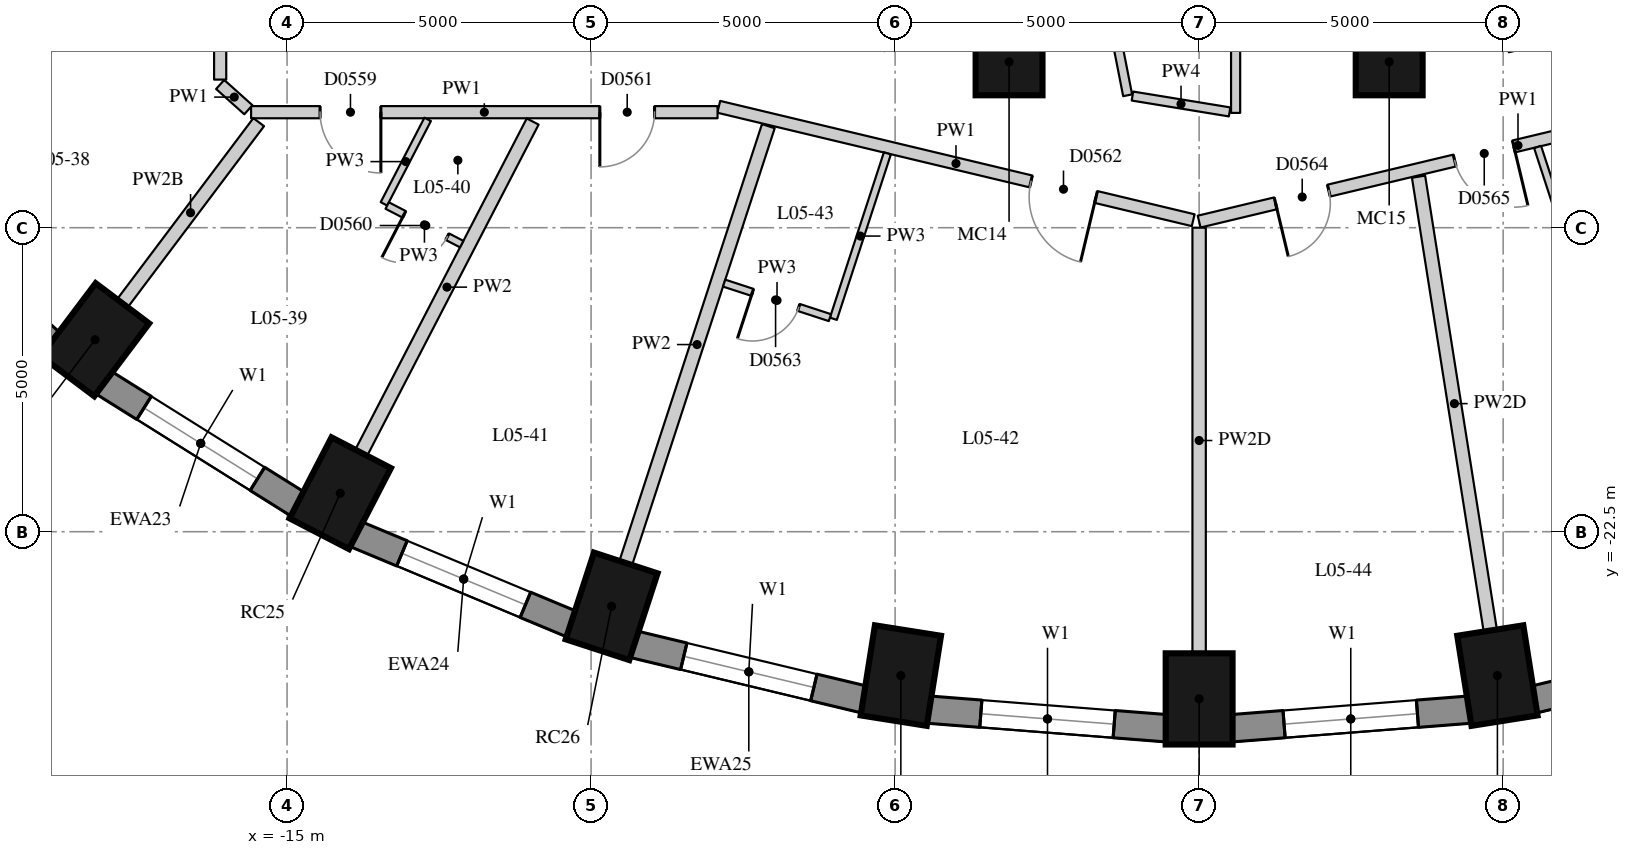
"""IFC4 building model, lengths in metres.
Left out: names, types, materials, properties, quantities, classifications, styles, units other than length and angle.
Written with IfcOpenShell. Run it as: python <this file> out.ifc"""

import sys

from ifc_helpers import new_model, si_unit, direction, frame, frame_2d, origin, origin_2d, place, context, subcontext, project, spatial, rectangle, extrude, element, fill, save


model = new_model("IFC4")
c1 = context("Model", 3, precision=1e-05, world=origin(), true_north=direction((0.0, 1.0)))
c2 = subcontext(c1, "Body", "Model", "MODEL_VIEW")
j1 = project(units=[si_unit("LENGTHUNIT", "METRE"), si_unit("PLANEANGLEUNIT", "RADIAN")], contexts=[c1])
p1 = place(None, origin())
s1 = spatial("IfcSite", under=j1, at=p1, CompositionType="ELEMENT")
p2 = place(p1, origin())
s2 = spatial("IfcBuilding", under=s1, at=p2, CompositionType="ELEMENT")
p3 = place(p2, frame((0.0, 0.0, 25.0)))
s3 = spatial("IfcBuildingStorey", under=s2, at=p3, CompositionType="ELEMENT", Elevation=25.0)
for number, where, z_axis, x_axis in (
    (1, (-18.159, -19.343, 0.0), (0.0, 0.0, 1.0), (-0.601, -0.799, 0.0)),
    (2, (-14.125, -21.867, 0.0), (0.0, 0.0, 1.0), (-0.46, -0.888, 0.0)),
    (3, (-9.662, -23.727, 0.0), (0.0, 0.0, 1.0), (-0.31, -0.951, 0.0)),
    (4, (-4.906, -24.866, 0.0), (0.0, 0.0, 1.0), (-0.156, -0.988, 0.0)),
    (5, (0.0, -25.25, 0.0), (0.0, 0.0, 1.0), (0.0, -1.0, 0.0)),
    (6, (4.906, -24.866, 0.0), (0.0, 0.0, 1.0), (0.156, -0.988, 0.0)),
):
    element("IfcColumn", number, at=place(p3, frame(where, z_axis=z_axis, x_axis=x_axis)), inside=s3, PredefinedType="COLUMN", context=c2, shape_type="SweptSolid", body=[
        extrude(rectangle(XDim=1.5, YDim=1.1, at=origin_2d()), origin(), (0.0, 0.0, 1.0), 3.3),
    ])
for number, where, z_axis, x_axis in (
    (7, (-3.126, -14.772, 0.0), (0.0, 0.0, 1.0), (1.0, 0.0, 0.0)),
    (8, (3.126, -14.772, 0.0), (0.0, 0.0, 1.0), (1.0, 0.0, 0.0)),
):
    element("IfcColumn", number, at=place(p3, frame(where, z_axis=z_axis, x_axis=x_axis)), inside=s3, PredefinedType="COLUMN", context=c2, shape_type="SweptSolid", body=[
        extrude(rectangle(XDim=1.1, YDim=1.1, at=origin_2d()), origin(), (0.0, 0.0, 1.0), 3.3),
    ])
p4 = place(p3, frame((-21.627, -16.943, 0.0), z_axis=(0.0, 0.0, 1.0), x_axis=(0.745526233716, -0.66647628228, 0.0)))
e9 = element("IfcWall", 9, at=p4, inside=s3, PredefinedType="SOLIDWALL", context=c2, shape_type="SweptSolid", body=[
    extrude(rectangle(XDim=3.697, YDim=0.45, at=frame_2d((1.848, 0.0))), origin(), (0.0, 0.0, 1.0), 3.02),
])
p5 = place(p4, frame((0.749, 0.0, 0.4)))
e10 = element("IfcOpeningElement", 10, at=p5, cuts=e9, PredefinedType="OPENING", context=c2, shape_type="SweptSolid", body=[
    extrude(rectangle(XDim=2.2, YDim=1.75, at=frame_2d((1.1, 0.875))), frame((0.0, 0.235, 0.0), z_axis=(0.0, -1.0, 0.0), x_axis=(1.0, 0.0, 0.0)), (0.0, 0.0, 1.0), 0.47),
])
p6 = place(p3, frame((-18.023, -20.044, 0.0), z_axis=(0.0, 0.0, 1.0), x_axis=(0.847635480093, -0.530579016629, 0.0)))
e11 = element("IfcWall", 11, at=p6, inside=s3, PredefinedType="SOLIDWALL", context=c2, shape_type="SweptSolid", body=[
    extrude(rectangle(XDim=3.782, YDim=0.45, at=frame_2d((1.891, 0.0))), origin(), (0.0, 0.0, 1.0), 3.02),
])
p7 = place(p6, frame((0.791, 0.0, 0.4)))
e12 = element("IfcOpeningElement", 12, at=p7, cuts=e11, PredefinedType="OPENING", context=c2, shape_type="SweptSolid", body=[
    extrude(rectangle(XDim=2.2, YDim=1.75, at=frame_2d((1.1, 0.875))), frame((0.0, 0.235, 0.0), z_axis=(0.0, -1.0, 0.0), x_axis=(1.0, 0.0, 0.0)), (0.0, 0.0, 1.0), 0.47),
])
p8 = place(p3, frame((-13.875, -22.537, 0.0), z_axis=(0.0, 0.0, 1.0), x_axis=(0.923031964282, -0.384723267966, 0.0)))
e13 = element("IfcWall", 13, at=p8, inside=s3, PredefinedType="SOLIDWALL", context=c2, shape_type="SweptSolid", body=[
    extrude(rectangle(XDim=3.856, YDim=0.45, at=frame_2d((1.928, 0.0))), origin(), (0.0, 0.0, 1.0), 3.02),
])
p9 = place(p8, frame((0.828, 0.0, 0.4)))
e14 = element("IfcOpeningElement", 14, at=p9, cuts=e13, PredefinedType="OPENING", context=c2, shape_type="SweptSolid", body=[
    extrude(rectangle(XDim=2.2, YDim=1.75, at=frame_2d((1.1, 0.875))), frame((0.0, 0.235, 0.0), z_axis=(0.0, -1.0, 0.0), x_axis=(1.0, 0.0, 0.0)), (0.0, 0.0, 1.0), 0.47),
])
p10 = place(p3, frame((-9.308, -24.35, 0.0), z_axis=(0.0, 0.0, 1.0), x_axis=(0.972496561493, -0.232917233979, 0.0)))
e15 = element("IfcWall", 15, at=p10, inside=s3, PredefinedType="SOLIDWALL", context=c2, shape_type="SweptSolid", body=[
    extrude(rectangle(XDim=3.911, YDim=0.45, at=frame_2d((1.956, 0.0))), origin(), (0.0, 0.0, 1.0), 3.02),
])
p11 = place(p10, frame((0.855, 0.0, 0.4)))
e16 = element("IfcOpeningElement", 16, at=p11, cuts=e15, PredefinedType="OPENING", context=c2, shape_type="SweptSolid", body=[
    extrude(rectangle(XDim=2.2, YDim=1.75, at=frame_2d((1.1, 0.875))), frame((0.0, 0.235, 0.0), z_axis=(0.0, -1.0, 0.0), x_axis=(1.0, 0.0, 0.0)), (0.0, 0.0, 1.0), 0.47),
])
p12 = place(p3, frame((-4.457, -25.426, 0.0), z_axis=(0.0, 0.0, 1.0), x_axis=(0.996955972145, -0.077966592873, 0.0)))
e17 = element("IfcWall", 17, at=p12, inside=s3, PredefinedType="SOLIDWALL", context=c2, shape_type="SweptSolid", body=[
    extrude(rectangle(XDim=3.939, YDim=0.45, at=frame_2d((1.97, 0.0))), origin(), (0.0, 0.0, 1.0), 3.02),
])
p13 = place(p12, frame((0.87, 0.0, 0.4)))
e18 = element("IfcOpeningElement", 18, at=p13, cuts=e17, PredefinedType="OPENING", context=c2, shape_type="SweptSolid", body=[
    extrude(rectangle(XDim=2.2, YDim=1.75, at=frame_2d((1.1, 0.875))), frame((0.0, 0.235, 0.0), z_axis=(0.0, -1.0, 0.0), x_axis=(1.0, 0.0, 0.0)), (0.0, 0.0, 1.0), 0.47),
])
p14 = place(p3, frame((0.53, -25.733, 0.0), z_axis=(0.0, 0.0, 1.0), x_axis=(0.996955972145, 0.077966592873, 0.0)))
e19 = element("IfcWall", 19, at=p14, inside=s3, PredefinedType="SOLIDWALL", context=c2, shape_type="SweptSolid", body=[
    extrude(rectangle(XDim=3.939, YDim=0.45, at=frame_2d((1.97, 0.0))), origin(), (0.0, 0.0, 1.0), 3.02),
])
p15 = place(p14, frame((0.87, 0.0, 0.4)))
e20 = element("IfcOpeningElement", 20, at=p15, cuts=e19, PredefinedType="OPENING", context=c2, shape_type="SweptSolid", body=[
    extrude(rectangle(XDim=2.2, YDim=1.75, at=frame_2d((1.1, 0.875))), frame((0.0, 0.235, 0.0), z_axis=(0.0, -1.0, 0.0), x_axis=(1.0, 0.0, 0.0)), (0.0, 0.0, 1.0), 0.47),
])
p16 = place(p3, frame((5.504, -25.26, 0.0), z_axis=(0.0, 0.0, 1.0), x_axis=(0.972496561493, 0.232917233979, 0.0)))
e21 = element("IfcWall", 21, at=p16, inside=s3, PredefinedType="SOLIDWALL", context=c2, shape_type="SweptSolid", body=[
    extrude(rectangle(XDim=3.911, YDim=0.45, at=frame_2d((1.956, 0.0))), origin(), (0.0, 0.0, 1.0), 3.02),
])
p17 = place(p16, frame((0.855, 0.0, 0.4)))
e22 = element("IfcOpeningElement", 22, at=p17, cuts=e21, PredefinedType="OPENING", context=c2, shape_type="SweptSolid", body=[
    extrude(rectangle(XDim=2.2, YDim=1.75, at=frame_2d((1.1, 0.875))), frame((0.0, 0.235, 0.0), z_axis=(0.0, -1.0, 0.0), x_axis=(1.0, 0.0, 0.0)), (0.0, 0.0, 1.0), 0.47),
])
p18 = place(p3, frame((10.488, -14.893, 0.0), z_axis=(0.0, 0.0, 1.0), x_axis=(-0.972603489924, -0.23247032367, 0.0)))
e23 = element("IfcWall", 23, at=p18, inside=s3, PredefinedType="PARTITIONING", context=c2, shape_type="SweptSolid", body=[
    extrude(rectangle(XDim=10.783, YDim=0.2, at=frame_2d((5.392, 0.0))), origin(), (0.0, 0.0, 1.0), 3.02),
])
p19 = place(p18, frame((8.59, 0.0, 0.0)))
e24 = element("IfcOpeningElement", 24, at=p19, cuts=e23, PredefinedType="OPENING", context=c2, shape_type="SweptSolid", body=[
    extrude(rectangle(XDim=0.9, YDim=2.1, at=frame_2d((0.45, 1.05))), frame((0.0, 0.11, 0.0), z_axis=(0.0, -1.0, 0.0), x_axis=(1.0, 0.0, 0.0)), (0.0, 0.0, 1.0), 0.22),
])
p20 = place(p18, frame((5.462, 0.0, 0.0)))
e25 = element("IfcOpeningElement", 25, at=p20, cuts=e23, PredefinedType="OPENING", context=c2, shape_type="SweptSolid", body=[
    extrude(rectangle(XDim=1.0, YDim=2.1, at=frame_2d((0.5, 1.05))), frame((0.0, 0.11, 0.0), z_axis=(0.0, -1.0, 0.0), x_axis=(1.0, 0.0, 0.0)), (0.0, 0.0, 1.0), 0.22),
])
p21 = place(p3, frame((-0.098, -17.377, 0.0), z_axis=(0.0, 0.0, 1.0), x_axis=(-0.97260043732, 0.232483094708, 0.0)))
e26 = element("IfcWall", 26, at=p21, inside=s3, PredefinedType="PARTITIONING", context=c2, shape_type="SweptSolid", body=[
    extrude(rectangle(XDim=8.022, YDim=0.2, at=frame_2d((4.011, 0.0))), origin(), (0.0, 0.0, 1.0), 3.02),
])
p22 = place(p21, frame((1.643, 0.0, 0.0)))
e27 = element("IfcOpeningElement", 27, at=p22, cuts=e26, PredefinedType="OPENING", context=c2, shape_type="SweptSolid", body=[
    extrude(rectangle(XDim=1.1, YDim=2.1, at=frame_2d((0.55, 1.05))), frame((0.0, 0.11, 0.0), z_axis=(0.0, -1.0, 0.0), x_axis=(1.0, 0.0, 0.0)), (0.0, 0.0, 1.0), 0.22),
])
p23 = place(p3, frame((-7.92, -15.6, 0.0), z_axis=(0.0, 0.0, 1.0), x_axis=(-1.0, 0.0, 0.0)))
e28 = element("IfcWall", 28, at=p23, inside=s3, PredefinedType="PARTITIONING", context=c2, shape_type="SweptSolid", body=[
    extrude(rectangle(XDim=7.672, YDim=0.2, at=frame_2d((3.836, 0.0))), origin(), (0.0, 0.0, 1.0), 3.02),
])
p24 = place(p23, frame((5.537, 0.0, 0.0)))
e29 = element("IfcOpeningElement", 29, at=p24, cuts=e28, PredefinedType="OPENING", context=c2, shape_type="SweptSolid", body=[
    extrude(rectangle(XDim=1.0, YDim=2.1, at=frame_2d((0.5, 1.05))), frame((0.0, 0.11, 0.0), z_axis=(0.0, -1.0, 0.0), x_axis=(1.0, 0.0, 0.0)), (0.0, 0.0, 1.0), 0.22),
])
p25 = place(p23, frame((1.036, 0.0, 0.0)))
e30 = element("IfcOpeningElement", 30, at=p25, cuts=e28, PredefinedType="OPENING", context=c2, shape_type="SweptSolid", body=[
    extrude(rectangle(XDim=0.9, YDim=2.1, at=frame_2d((0.45, 1.05))), frame((0.0, 0.11, 0.0), z_axis=(0.0, -1.0, 0.0), x_axis=(1.0, 0.0, 0.0)), (0.0, 0.0, 1.0), 0.22),
])
p26 = place(p3, frame((-15.636, -15.56, 0.0), z_axis=(0.0, 0.0, 1.0), x_axis=(-0.744656758283, 0.667447610187, 0.0)))
e31 = element("IfcWall", 31, at=p26, inside=s3, PredefinedType="PARTITIONING", context=c2, shape_type="SweptSolid", body=[
    extrude(rectangle(XDim=0.623, YDim=0.2, at=frame_2d((0.312, 0.0))), origin(), (0.0, 0.0, 1.0), 3.02),
])
p27 = place(p3, frame((-16.1, -15.064, 0.0), z_axis=(0.0, 0.0, 1.0), x_axis=(0.0, 1.0, 0.0)))
e32 = element("IfcWall", 32, at=p27, inside=s3, PredefinedType="PARTITIONING", context=c2, shape_type="SweptSolid", body=[
    extrude(rectangle(XDim=6.047, YDim=0.2, at=frame_2d((3.023, 0.0))), origin(), (0.0, 0.0, 1.0), 3.02),
])
p28 = place(p27, frame((4.727, 0.0, 0.0)))
e33 = element("IfcOpeningElement", 33, at=p28, cuts=e32, PredefinedType="OPENING", context=c2, shape_type="SweptSolid", body=[
    extrude(rectangle(XDim=1.1, YDim=2.1, at=frame_2d((0.55, 1.05))), frame((0.0, 0.11, 0.0), z_axis=(0.0, -1.0, 0.0), x_axis=(1.0, 0.0, 0.0)), (0.0, 0.0, 1.0), 0.22),
])
p29 = place(p27, frame((1.467, 0.0, 0.0)))
e34 = element("IfcOpeningElement", 34, at=p29, cuts=e32, PredefinedType="OPENING", context=c2, shape_type="SweptSolid", body=[
    extrude(rectangle(XDim=1.1, YDim=2.1, at=frame_2d((0.55, 1.05))), frame((0.0, 0.11, 0.0), z_axis=(0.0, -1.0, 0.0), x_axis=(1.0, 0.0, 0.0)), (0.0, 0.0, 1.0), 0.22),
])
p30 = place(p3, frame((-1.176, -15.322, 0.0), z_axis=(0.0, 0.0, 1.0), x_axis=(-0.192477233237, 0.981301439256, 0.0)))
e35 = element("IfcWall", 35, at=p30, inside=s3, PredefinedType="PARTITIONING", context=c2, shape_type="SweptSolid", body=[
    extrude(rectangle(XDim=2.13, YDim=0.15, at=frame_2d((1.065, 0.0))), origin(), (0.0, 0.0, 1.0), 3.02),
])
p31 = place(p3, frame((0.6, -9.23, 0.0), z_axis=(0.0, 0.0, 1.0), x_axis=(0.0, -1.0, 0.0)))
e36 = element("IfcWall", 36, at=p31, inside=s3, PredefinedType="PARTITIONING", context=c2, shape_type="SweptSolid", body=[
    extrude(rectangle(XDim=6.382, YDim=0.15, at=frame_2d((3.191, 0.0))), origin(), (0.0, 0.0, 1.0), 2.47),
])
p32 = place(p3, frame((0.501, -15.596, 0.0), z_axis=(0.0, 0.0, 1.0), x_axis=(-0.986922601781, 0.161194845119, 0.0)))
e37 = element("IfcWall", 37, at=p32, inside=s3, PredefinedType="PARTITIONING", context=c2, shape_type="SweptSolid", body=[
    extrude(rectangle(XDim=1.619, YDim=0.15, at=frame_2d((0.81, 0.0))), origin(), (0.0, 0.0, 1.0), 3.02),
])
p33 = place(p3, frame((9.673, -13.443, 0.0), z_axis=(0.0, 0.0, 1.0), x_axis=(-0.972603013932, -0.232472315103, 0.0)))
e38 = element("IfcWall", 38, at=p33, inside=s3, PredefinedType="PARTITIONING", context=c2, shape_type="SweptSolid", body=[
    extrude(rectangle(XDim=4.727, YDim=0.15, at=frame_2d((2.363, 0.0))), origin(), (0.0, 0.0, 1.0), 3.02),
])
p34 = place(p33, frame((1.914, 0.0, 0.0)))
e39 = element("IfcOpeningElement", 39, at=p34, cuts=e38, PredefinedType="OPENING", context=c2, shape_type="SweptSolid", body=[
    extrude(rectangle(XDim=0.9, YDim=2.1, at=frame_2d((0.45, 1.05))), frame((0.0, 0.085, 0.0), z_axis=(0.0, -1.0, 0.0), x_axis=(1.0, 0.0, 0.0)), (0.0, 0.0, 1.0), 0.17),
])
p35 = place(p3, frame((-21.093, -15.718, 0.0), z_axis=(0.0, 0.0, 1.0), x_axis=(0.73009284205, 0.683347965525, 0.0)))
e40 = element("IfcWall", 40, at=p35, inside=s3, PredefinedType="PARTITIONING", context=c2, shape_type="SweptSolid", body=[
    extrude(rectangle(XDim=6.602, YDim=0.22, at=frame_2d((3.301, 0.0))), origin(), (0.0, 0.0, 1.0), 3.02),
])
p36 = place(p3, frame((-17.708, -18.743, 0.0), z_axis=(0.0, 0.0, 1.0), x_axis=(0.601172757903, 0.799119086967, 0.0)))
e41 = element("IfcWall", 41, at=p36, inside=s3, PredefinedType="PARTITIONING", context=c2, shape_type="SweptSolid", body=[
    extrude(rectangle(XDim=3.729, YDim=0.22, at=frame_2d((1.864, 0.0))), origin(), (0.0, 0.0, 1.0), 2.57),
])
p37 = place(p3, frame((-13.78, -21.201, 0.0), z_axis=(0.0, 0.0, 1.0), x_axis=(0.459699000582, 0.888074787878, 0.0)))
e42 = element("IfcWall", 42, at=p37, inside=s3, PredefinedType="PARTITIONING", context=c2, shape_type="SweptSolid", body=[
    extrude(rectangle(XDim=6.134, YDim=0.22, at=frame_2d((3.067, 0.0))), origin(), (0.0, 0.0, 1.0), 3.02),
])
p38 = place(p3, frame((-9.429, -23.014, 0.0), z_axis=(0.0, 0.0, 1.0), x_axis=(0.310261176215, 0.950651356983, 0.0)))
e43 = element("IfcWall", 43, at=p38, inside=s3, PredefinedType="PARTITIONING", context=c2, shape_type="SweptSolid", body=[
    extrude(rectangle(XDim=7.557, YDim=0.22, at=frame_2d((3.779, 0.0))), origin(), (0.0, 0.0, 1.0), 3.02),
])
p39 = place(p3, frame((0.0, -24.5, 0.0), z_axis=(0.0, 0.0, 1.0), x_axis=(0.0, 1.0, 0.0)))
e44 = element("IfcWall", 44, at=p39, inside=s3, PredefinedType="PARTITIONING", context=c2, shape_type="SweptSolid", body=[
    extrude(rectangle(XDim=7.0, YDim=0.22, at=frame_2d((3.5, 0.0))), origin(), (0.0, 0.0, 1.0), 2.47),
])
p40 = place(p3, frame((4.788, -24.125, 0.0), z_axis=(0.0, 0.0, 1.0), x_axis=(-0.156131781396, 0.987736233434, 0.0)))
e45 = element("IfcWall", 45, at=p40, inside=s3, PredefinedType="PARTITIONING", context=c2, shape_type="SweptSolid", body=[
    extrude(rectangle(XDim=7.557, YDim=0.22, at=frame_2d((3.779, 0.0))), origin(), (0.0, 0.0, 1.0), 2.47),
])
p41 = place(p3, frame((-12.687, -15.718, 0.0), z_axis=(0.0, 0.0, 1.0), x_axis=(-0.459775159711, -0.888035361071, 0.0)))
e46 = element("IfcWall", 46, at=p41, inside=s3, PredefinedType="PARTITIONING", context=c2, shape_type="SweptSolid", body=[
    extrude(rectangle(XDim=1.565, YDim=0.12, at=frame_2d((0.782, 0.0))), origin(), (0.0, 0.0, 1.0), 3.02),
])
p42 = place(p3, frame((-5.127, -16.277, 0.0), z_axis=(0.0, 0.0, 1.0), x_axis=(-0.310206676877, -0.950669142037, 0.0)))
e47 = element("IfcWall", 47, at=p42, inside=s3, PredefinedType="PARTITIONING", context=c2, shape_type="SweptSolid", body=[
    extrude(rectangle(XDim=2.862, YDim=0.12, at=frame_2d((1.431, 0.0))), origin(), (0.0, 0.0, 1.0), 3.02),
])
p43 = place(p3, frame((5.566, -16.172, 0.0), z_axis=(0.0, 0.0, 1.0), x_axis=(0.310159281599, -0.950684605975, 0.0)))
e48 = element("IfcWall", 48, at=p43, inside=s3, PredefinedType="PARTITIONING", context=c2, shape_type="SweptSolid", body=[
    extrude(rectangle(XDim=2.525, YDim=0.12, at=frame_2d((1.263, 0.0))), origin(), (0.0, 0.0, 1.0), 3.02),
])
p44 = place(p3, frame((-13.353, -17.135, 0.0), z_axis=(0.0, 0.0, 1.0), x_axis=(0.888075681402, -0.459697274413, 0.0)))
e49 = element("IfcWall", 49, at=p44, inside=s3, PredefinedType="PARTITIONING", context=c2, shape_type="SweptSolid", body=[
    extrude(rectangle(XDim=1.38, YDim=0.12, at=frame_2d((0.69, 0.0))), origin(), (0.0, 0.0, 1.0), 3.02),
])
p45 = place(p44, frame((0.315, 0.0, 0.0)))
e50 = element("IfcOpeningElement", 50, at=p45, cuts=e49, PredefinedType="OPENING", context=c2, shape_type="SweptSolid", body=[
    extrude(rectangle(XDim=0.8, YDim=2.1, at=frame_2d((0.4, 1.05))), frame((0.0, 0.07, 0.0), z_axis=(0.0, -1.0, 0.0), x_axis=(1.0, 0.0, 0.0)), (0.0, 0.0, 1.0), 0.14),
])
p46 = place(p3, frame((-6.072, -18.979, 0.0), z_axis=(0.0, 0.0, 1.0), x_axis=(-0.950678536911, 0.31017788357, 0.0)))
e51 = element("IfcWall", 51, at=p46, inside=s3, PredefinedType="PARTITIONING", context=c2, shape_type="SweptSolid", body=[
    extrude(rectangle(XDim=1.83, YDim=0.12, at=frame_2d((0.915, 0.0))), origin(), (0.0, 0.0, 1.0), 3.02),
])
p47 = place(p46, frame((0.54, 0.0, 0.0)))
e52 = element("IfcOpeningElement", 52, at=p47, cuts=e51, PredefinedType="OPENING", context=c2, shape_type="SweptSolid", body=[
    extrude(rectangle(XDim=0.8, YDim=2.1, at=frame_2d((0.4, 1.05))), frame((0.0, 0.07, 0.0), z_axis=(0.0, -1.0, 0.0), x_axis=(1.0, 0.0, 0.0)), (0.0, 0.0, 1.0), 0.14),
])
p48 = place(p7, origin())
e53 = element("IfcWindow", 53, at=p48, inside=s3, PartitioningType="SINGLE_PANEL", PredefinedType="WINDOW", context=c2, shape_type="SweptSolid", body=[
    extrude(rectangle(XDim=2.2, YDim=1.75, at=frame_2d((1.1, 0.875))), frame((0.0, 0.035, 0.0), z_axis=(0.0, -1.0, 0.0), x_axis=(1.0, 0.0, 0.0)), (0.0, 0.0, 1.0), 0.06),
])
fill(e12, e53)
p49 = place(p9, origin())
e54 = element("IfcWindow", 54, at=p49, inside=s3, PartitioningType="SINGLE_PANEL", PredefinedType="WINDOW", context=c2, shape_type="SweptSolid", body=[
    extrude(rectangle(XDim=2.2, YDim=1.75, at=frame_2d((1.1, 0.875))), frame((0.0, 0.035, 0.0), z_axis=(0.0, -1.0, 0.0), x_axis=(1.0, 0.0, 0.0)), (0.0, 0.0, 1.0), 0.06),
])
fill(e14, e54)
p50 = place(p11, origin())
e55 = element("IfcWindow", 55, at=p50, inside=s3, PartitioningType="SINGLE_PANEL", PredefinedType="WINDOW", context=c2, shape_type="SweptSolid", body=[
    extrude(rectangle(XDim=2.2, YDim=1.75, at=frame_2d((1.1, 0.875))), frame((0.0, 0.035, 0.0), z_axis=(0.0, -1.0, 0.0), x_axis=(1.0, 0.0, 0.0)), (0.0, 0.0, 1.0), 0.06),
])
fill(e16, e55)
p51 = place(p13, origin())
e56 = element("IfcWindow", 56, at=p51, inside=s3, PartitioningType="SINGLE_PANEL", PredefinedType="WINDOW", context=c2, shape_type="SweptSolid", body=[
    extrude(rectangle(XDim=2.2, YDim=1.75, at=frame_2d((1.1, 0.875))), frame((0.0, 0.035, 0.0), z_axis=(0.0, -1.0, 0.0), x_axis=(1.0, 0.0, 0.0)), (0.0, 0.0, 1.0), 0.06),
])
fill(e18, e56)
p52 = place(p15, origin())
e57 = element("IfcWindow", 57, at=p52, inside=s3, PartitioningType="SINGLE_PANEL", PredefinedType="WINDOW", context=c2, shape_type="SweptSolid", body=[
    extrude(rectangle(XDim=2.2, YDim=1.75, at=frame_2d((1.1, 0.875))), frame((0.0, 0.035, 0.0), z_axis=(0.0, -1.0, 0.0), x_axis=(1.0, 0.0, 0.0)), (0.0, 0.0, 1.0), 0.06),
])
fill(e20, e57)
p53 = place(p24, origin())
e58 = element("IfcDoor", 58, at=p53, inside=s3, OperationType="SINGLE_SWING_LEFT", PredefinedType="DOOR", context=c2, shape_type="SweptSolid", body=[
    extrude(rectangle(XDim=1.0, YDim=2.1, at=frame_2d((0.5, 1.05))), frame((0.0, 0.025, 0.0), z_axis=(0.0, -1.0, 0.0), x_axis=(1.0, 0.0, 0.0)), (0.0, 0.0, 1.0), 0.05),
])
fill(e29, e58)
p54 = place(p45, origin())
e59 = element("IfcDoor", 59, at=p54, inside=s3, OperationType="SINGLE_SWING_RIGHT", PredefinedType="DOOR", context=c2, shape_type="SweptSolid", body=[
    extrude(rectangle(XDim=0.8, YDim=2.1, at=frame_2d((0.4, 1.05))), frame((0.0, 0.025, 0.0), z_axis=(0.0, -1.0, 0.0), x_axis=(1.0, 0.0, 0.0)), (0.0, 0.0, 1.0), 0.05),
])
fill(e50, e59)
p55 = place(p25, origin())
e60 = element("IfcDoor", 60, at=p55, inside=s3, OperationType="SINGLE_SWING_RIGHT", PredefinedType="DOOR", context=c2, shape_type="SweptSolid", body=[
    extrude(rectangle(XDim=0.9, YDim=2.1, at=frame_2d((0.45, 1.05))), frame((0.0, 0.025, 0.0), z_axis=(0.0, -1.0, 0.0), x_axis=(1.0, 0.0, 0.0)), (0.0, 0.0, 1.0), 0.05),
])
fill(e30, e60)
p56 = place(p22, origin())
e61 = element("IfcDoor", 61, at=p56, inside=s3, OperationType="SINGLE_SWING_LEFT", PredefinedType="DOOR", context=c2, shape_type="SweptSolid", body=[
    extrude(rectangle(XDim=1.1, YDim=2.1, at=frame_2d((0.55, 1.05))), frame((0.0, 0.025, 0.0), z_axis=(0.0, -1.0, 0.0), x_axis=(1.0, 0.0, 0.0)), (0.0, 0.0, 1.0), 0.05),
])
fill(e27, e61)
p57 = place(p47, origin())
e62 = element("IfcDoor", 62, at=p57, inside=s3, OperationType="SINGLE_SWING_RIGHT", PredefinedType="DOOR", context=c2, shape_type="SweptSolid", body=[
    extrude(rectangle(XDim=0.8, YDim=2.1, at=frame_2d((0.4, 1.05))), frame((0.0, 0.025, 0.0), z_axis=(0.0, -1.0, 0.0), x_axis=(1.0, 0.0, 0.0)), (0.0, 0.0, 1.0), 0.05),
])
fill(e52, e62)
p58 = place(p19, origin())
e63 = element("IfcDoor", 63, at=p58, inside=s3, OperationType="SINGLE_SWING_RIGHT", PredefinedType="DOOR", context=c2, shape_type="SweptSolid", body=[
    extrude(rectangle(XDim=0.9, YDim=2.1, at=frame_2d((0.45, 1.05))), frame((0.0, 0.025, 0.0), z_axis=(0.0, -1.0, 0.0), x_axis=(1.0, 0.0, 0.0)), (0.0, 0.0, 1.0), 0.05),
])
fill(e24, e63)
p59 = place(p20, origin())
e64 = element("IfcDoor", 64, at=p59, inside=s3, OperationType="SINGLE_SWING_LEFT", PredefinedType="DOOR", context=c2, shape_type="SweptSolid", body=[
    extrude(rectangle(XDim=1.0, YDim=2.1, at=frame_2d((0.5, 1.05))), frame((0.0, 0.025, 0.0), z_axis=(0.0, -1.0, 0.0), x_axis=(1.0, 0.0, 0.0)), (0.0, 0.0, 1.0), 0.05),
])
fill(e25, e64)
save(model, sys.argv[1])
